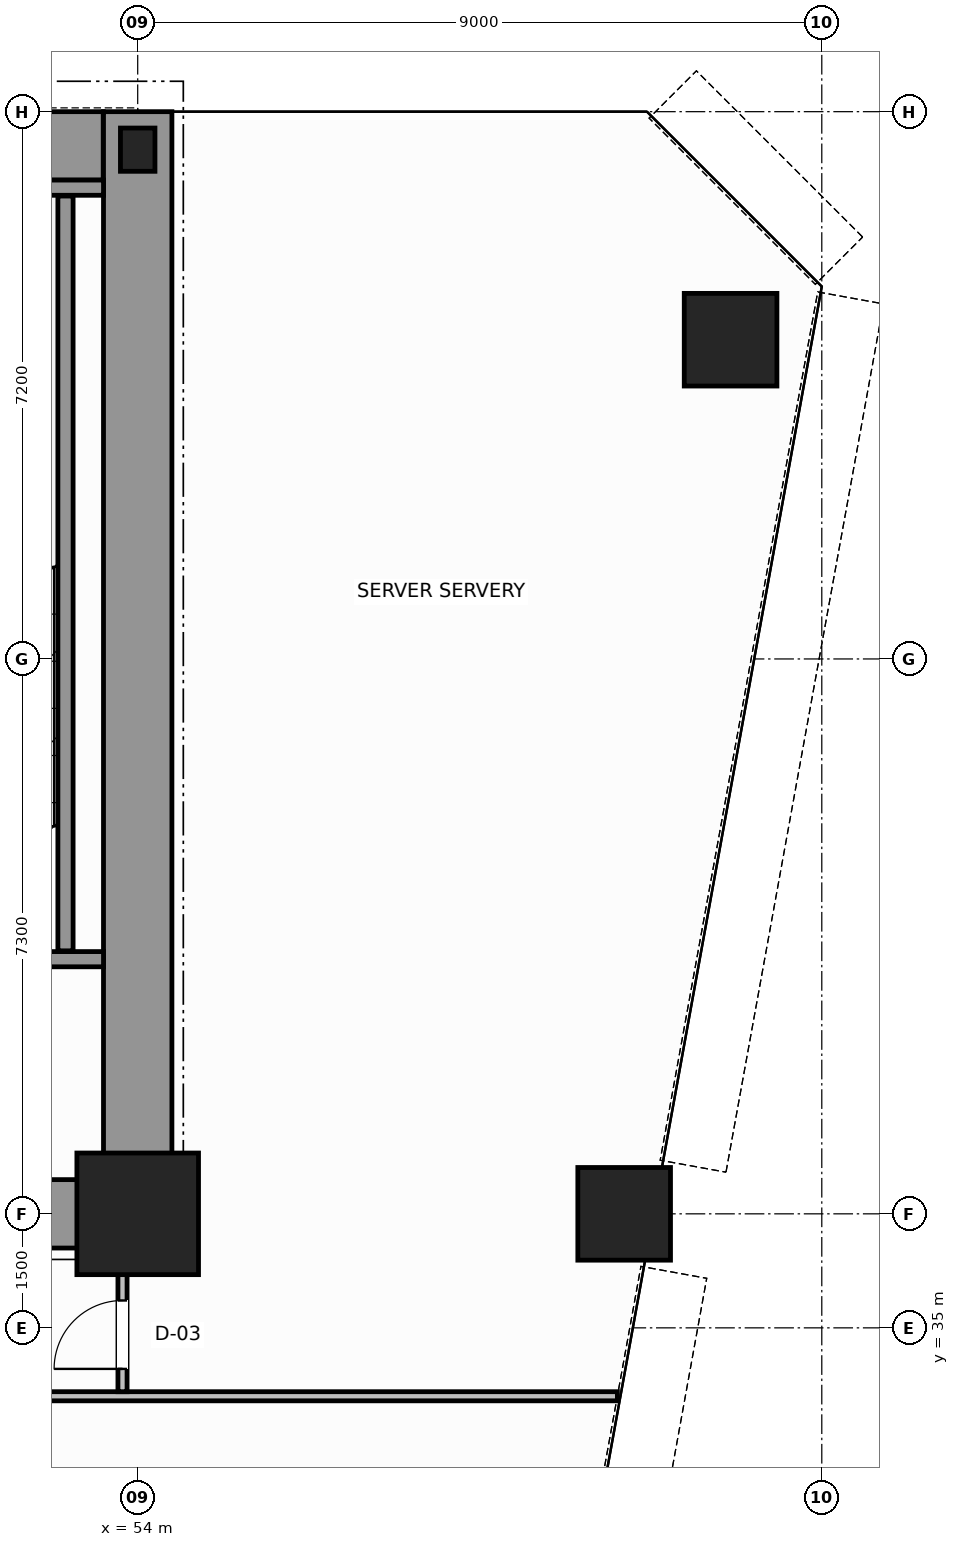
"""IFC4 building model, lengths in metres.
Left out: names, types, materials, properties, quantities, classifications, styles, units other than length and angle.
Written with IfcOpenShell. Run it as: python <this file> out.ifc"""

import sys

from ifc_helpers import new_model, si_unit, direction, frame, frame_2d, origin, origin_2d, place, context, subcontext, project, spatial, rectangle, hollow_circle, i_section, extrude, source, transform, mapped, element, fill, save


model = new_model("IFC4")
c1 = context("Model", 3, precision=1e-05, world=origin(), true_north=direction((0.0, 1.0)))
c2 = subcontext(c1, "Body", "Model", "MODEL_VIEW")
j1 = project(units=[si_unit("LENGTHUNIT", "METRE"), si_unit("PLANEANGLEUNIT", "RADIAN")], contexts=[c1])
p1 = place(None, origin())
s1 = spatial("IfcSite", under=j1, at=p1, CompositionType="ELEMENT")
p2 = place(p1, origin())
s2 = spatial("IfcBuilding", under=s1, at=p2, CompositionType="ELEMENT")
p3 = place(p2, frame((0.0, 0.0, 22.6)))
s3 = spatial("IfcBuildingStorey", under=s2, at=p3, CompositionType="ELEMENT", Elevation=22.6)
m1 = source(origin(), c2, "Body", "SweptSolid", [
    extrude(rectangle(XDim=1.6, YDim=1.6, at=origin_2d()), origin(), (0.0, 0.0, 1.0), 3.8),
])
p4 = place(p3, frame((54.0, 36.5, 0.0), z_axis=(0.0, 0.0, 1.0), x_axis=(1.0, 0.0, 0.0)))
e1 = element("IfcColumn", 1, at=p4, inside=s3, PredefinedType="COLUMN", context=c2, shape_type="MappedRepresentation", body=[
    mapped(m1, transform((0.0, 0.0, 0.0), scale=1.0)),
])
m2 = source(origin(), c2, "Body", "SweptSolid", [
    extrude(i_section(OverallWidth=0.454, OverallDepth=0.569, WebThickness=0.078, FlangeThickness=0.08, FilletRadius=0.015, at=origin_2d()), origin(), (0.0, 0.0, 1.0), 3.8),
])
p5 = place(p3, frame((54.0, 50.5, 0.0), z_axis=(0.0, 0.0, 1.0), x_axis=(1.0, 0.0, 0.0)))
e2 = element("IfcColumn", 2, at=p5, inside=s3, PredefinedType="COLUMN", context=c2, shape_type="MappedRepresentation", body=[
    mapped(m2, transform((0.0, 0.0, 0.0), scale=1.0)),
])
m3 = source(origin(), c2, "Body", "SweptSolid", [
    extrude(hollow_circle(Radius=0.61, WallThickness=0.05, at=origin_2d()), origin(), (0.0, 0.0, 1.0), 3.8),
])
for number, where, z_axis, x_axis in (
    (3, (61.8, 48.0, 0.0), (0.0, 0.0, 1.0), (1.0, 0.0, 0.0)),
    (4, (60.4, 36.5, 0.0), (0.0, 0.0, 1.0), (1.0, 0.0, 0.0)),
):
    element("IfcColumn", number, at=place(p3, frame(where, z_axis=z_axis, x_axis=x_axis)), inside=s3, PredefinedType="COLUMN", context=c2, shape_type="MappedRepresentation", body=[
        mapped(m3, transform((0.0, 0.0, 0.0), scale=1.0)),
    ])
p6 = place(p3, frame((34.002, 50.55, 0.0), z_axis=(0.0, 0.0, 1.0), x_axis=(1.0, 0.0, 0.0)))
e5 = element("IfcWall", 5, at=p6, inside=s3, PredefinedType="SHEAR", context=c2, shape_type="SweptSolid", body=[
    extrude(rectangle(XDim=19.544, YDim=0.9, at=frame_2d((9.772, 0.0))), origin(), (0.0, 0.0, 1.0), 3.8),
])
p7 = place(p3, frame((54.0, 36.5, 0.0), z_axis=(0.0, 0.0, 1.0), x_axis=(0.0, 1.0, 0.0)))
e6 = element("IfcWall", 6, at=p7, inside=s3, PredefinedType="SHEAR", context=c2, shape_type="SweptSolid", body=[
    extrude(rectangle(XDim=14.5, YDim=0.9, at=frame_2d((7.25, 0.0))), origin(), (0.0, 0.0, 1.0), 3.8),
])
p8 = place(p3, frame((49.8, 36.5, 0.0), z_axis=(0.0, 0.0, 1.0), x_axis=(1.0, 0.0, 0.0)))
e7 = element("IfcWall", 7, at=p8, inside=s3, PredefinedType="SHEAR", context=c2, shape_type="SweptSolid", body=[
    extrude(rectangle(XDim=3.73, YDim=0.9, at=frame_2d((1.865, 0.0))), origin(), (0.0, 0.0, 1.0), 2.38),
])
p9 = place(p3, frame((49.4, 39.85, 0.0), z_axis=(0.0, 0.0, 1.0), x_axis=(1.0, 0.0, 0.0)))
e8 = element("IfcWall", 8, at=p9, inside=s3, PredefinedType="SOLIDWALL", context=c2, shape_type="SweptSolid", body=[
    extrude(rectangle(XDim=4.15, YDim=0.2, at=frame_2d((2.075, 0.0))), origin(), (0.0, 0.0, 1.0), 3.8),
])
p10 = place(p9, frame((1.325, 0.0, 0.0)))
e9 = element("IfcOpeningElement", 9, at=p10, cuts=e8, PredefinedType="OPENING", context=c2, shape_type="SweptSolid", body=[
    extrude(rectangle(XDim=1.1, YDim=2.15, at=frame_2d((0.55, 1.075))), frame((0.0, 0.11, 0.0), z_axis=(0.0, -1.0, 0.0), x_axis=(1.0, 0.0, 0.0)), (0.0, 0.0, 1.0), 0.22),
])
p11 = place(p3, frame((49.4, 50.0, 0.0), z_axis=(0.0, 0.0, 1.0), x_axis=(1.0, 0.0, 0.0)))
e10 = element("IfcWall", 10, at=p11, inside=s3, PredefinedType="SOLIDWALL", context=c2, shape_type="SweptSolid", body=[
    extrude(rectangle(XDim=4.15, YDim=0.2, at=frame_2d((2.075, 0.0))), origin(), (0.0, 0.0, 1.0), 3.8),
])
p12 = place(p3, frame((53.05, 39.96, 0.0), z_axis=(0.0, 0.0, 1.0), x_axis=(0.0, 1.0, 0.0)))
e11 = element("IfcWall", 11, at=p12, inside=s3, PredefinedType="SOLIDWALL", context=c2, shape_type="SweptSolid", body=[
    extrude(rectangle(XDim=9.93, YDim=0.2, at=frame_2d((4.965, 0.0))), origin(), (0.0, 0.0, 1.0), 3.8),
])
p13 = place(p3, frame((48.46, 34.1, 0.0), z_axis=(0.0, 0.0, 1.0), x_axis=(1.0, 0.0, 0.0)))
e12 = element("IfcWall", 12, at=p13, inside=s3, PredefinedType="PARTITIONING", context=c2, shape_type="SweptSolid", body=[
    extrude(rectangle(XDim=11.851, YDim=0.12, at=frame_2d((5.926, 0.0))), origin(), (0.0, 0.0, 1.0), 3.58),
])
p14 = place(p3, frame((53.8, 34.16, 0.0), z_axis=(0.0, 0.0, 1.0), x_axis=(0.0, 1.0, 0.0)))
e13 = element("IfcWall", 13, at=p14, inside=s3, PredefinedType="PARTITIONING", context=c2, shape_type="SweptSolid", body=[
    extrude(rectangle(XDim=2.28, YDim=0.12, at=frame_2d((1.14, 0.0))), origin(), (0.0, 0.0, 1.0), 3.58),
])
p15 = place(p14, frame((0.3, 0.0, 0.0)))
e14 = element("IfcOpeningElement", 14, at=p15, cuts=e13, PredefinedType="OPENING", context=c2, shape_type="SweptSolid", body=[
    extrude(rectangle(XDim=0.9, YDim=2.15, at=frame_2d((0.45, 1.075))), frame((0.0, 0.07, 0.0), z_axis=(0.0, -1.0, 0.0), x_axis=(1.0, 0.0, 0.0)), (0.0, 0.0, 1.0), 0.14),
])
m4 = source(origin(), c2, "Body", "SweptSolid", [
    extrude(rectangle(XDim=0.9, YDim=2.15, at=frame_2d((0.45, 1.075))), frame((0.0, 0.025, 0.0), z_axis=(0.0, -1.0, 0.0), x_axis=(1.0, 0.0, 0.0)), (0.0, 0.0, 1.0), 0.05),
])
p16 = place(p15, origin())
e15 = element("IfcDoor", 15, at=p16, inside=s3, OperationType="SINGLE_SWING_RIGHT", PredefinedType="DOOR", context=c2, shape_type="MappedRepresentation", body=[
    mapped(m4, transform((0.0, 0.0, 0.0), scale=1.0)),
])
fill(e14, e15)
save(model, sys.argv[1])
